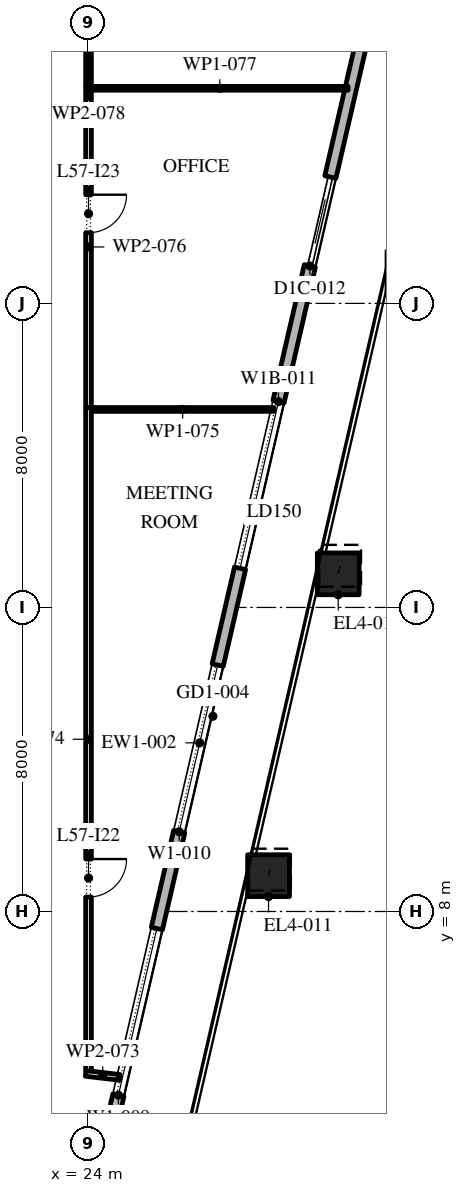
"""IFC4 building model, lengths in metres.
Left out: names, types, materials, properties, quantities, classifications, styles, units other than length and angle.
Written with IfcOpenShell. Run it as: python <this file> out.ifc"""

import sys

from ifc_helpers import new_model, si_unit, direction, frame, frame_2d, origin, origin_2d, place, context, subcontext, project, spatial, rectangle, extrude, element, fill, save


model = new_model("IFC4")
c1 = context("Model", 3, precision=1e-05, world=origin(), true_north=direction((0.0, 1.0)))
c2 = subcontext(c1, "Body", "Model", "MODEL_VIEW")
j1 = project(units=[si_unit("LENGTHUNIT", "METRE"), si_unit("PLANEANGLEUNIT", "RADIAN")], contexts=[c1])
p1 = place(None, origin())
s1 = spatial("IfcSite", under=j1, at=p1, CompositionType="ELEMENT")
p2 = place(p1, origin())
s2 = spatial("IfcBuilding", under=s1, at=p2, CompositionType="ELEMENT")
p3 = place(p2, frame((0.0, 0.0, 264.0)))
s3 = spatial("IfcBuildingStorey", under=s2, at=p3, CompositionType="ELEMENT", Elevation=264.0)
p4 = place(p3, frame((28.737, 8.943, 0.0), z_axis=(0.008770884695, 0.037929719907, 0.99924191662), x_axis=(-0.974290512438, 0.225295355862, 0.0)))
e1 = element("IfcColumn", 1, at=p4, inside=s3, PredefinedType="COLUMN", context=c2, shape_type="SweptSolid", body=[
    extrude(rectangle(XDim=1.1, YDim=1.1, at=origin_2d()), origin(), (0.0, 0.0, 1.0), 4.203),
])
p5 = place(p3, frame((30.57, 16.885, 0.0), z_axis=(0.011668301382, 0.050504588071, 0.998655665045), x_axis=(-0.974334539389, 0.225104876342, 0.0)))
e2 = element("IfcColumn", 2, at=p5, inside=s3, PredefinedType="COLUMN", context=c2, shape_type="SweptSolid", body=[
    extrude(rectangle(XDim=1.1, YDim=1.1, at=origin_2d()), origin(), (0.0, 0.0, 1.0), 4.206),
])
p6 = place(p3, frame((32.404, 24.826, 0.0), z_axis=(0.014559841898, 0.063111984005, 0.997900239743), x_axis=(-0.97440628778, 0.224794097641, 0.0)))
e3 = element("IfcColumn", 3, at=p6, inside=s3, PredefinedType="COLUMN", context=c2, shape_type="SweptSolid", body=[
    extrude(rectangle(XDim=1.1, YDim=1.1, at=origin_2d()), origin(), (0.0, 0.0, 1.0), 4.209),
])
p7 = place(p3, frame((21.359, -11.678, 0.0), z_axis=(0.0, 0.0, 1.0), x_axis=(0.224949198343, 0.974370493275, 0.0)))
e4 = element("IfcWall", 4, at=p7, inside=s3, PredefinedType="STANDARD", context=c2, shape_type="SweptSolid", body=[
    extrude(rectangle(XDim=49.5, YDim=0.3, at=frame_2d((24.75, 0.0))), origin(), (0.0, 0.0, 1.0), 4.0),
])
p8 = place(p7, frame((1.157, 0.0, 0.45)))
e5 = element("IfcOpeningElement", 5, at=p8, cuts=e4, PredefinedType="OPENING", context=c2, shape_type="SweptSolid", body=[
    extrude(rectangle(XDim=4.5, YDim=3.05, at=frame_2d((2.25, 1.525))), frame((0.0, 0.16, 0.0), z_axis=(0.0, -1.0, 0.0), x_axis=(1.0, 0.0, 0.0)), (0.0, 0.0, 1.0), 0.32),
])
p9 = place(p7, frame((8.121, 0.0, 0.45)))
e6 = element("IfcOpeningElement", 6, at=p9, cuts=e4, PredefinedType="OPENING", context=c2, shape_type="SweptSolid", body=[
    extrude(rectangle(XDim=4.5, YDim=3.05, at=frame_2d((2.25, 1.525))), frame((0.0, 0.16, 0.0), z_axis=(0.0, -1.0, 0.0), x_axis=(1.0, 0.0, 0.0)), (0.0, 0.0, 1.0), 0.32),
])
p10 = place(p7, frame((15.236, 0.0, 0.45)))
e7 = element("IfcOpeningElement", 7, at=p10, cuts=e4, PredefinedType="OPENING", context=c2, shape_type="SweptSolid", body=[
    extrude(rectangle(XDim=4.5, YDim=3.05, at=frame_2d((2.25, 1.525))), frame((0.0, 0.16, 0.0), z_axis=(0.0, -1.0, 0.0), x_axis=(1.0, 0.0, 0.0)), (0.0, 0.0, 1.0), 0.32),
])
p11 = place(p7, frame((22.35, 0.0, 0.45)))
e8 = element("IfcOpeningElement", 8, at=p11, cuts=e4, PredefinedType="OPENING", context=c2, shape_type="SweptSolid", body=[
    extrude(rectangle(XDim=4.5, YDim=3.05, at=frame_2d((2.25, 1.525))), frame((0.0, 0.16, 0.0), z_axis=(0.0, -1.0, 0.0), x_axis=(1.0, 0.0, 0.0)), (0.0, 0.0, 1.0), 0.32),
])
p12 = place(p7, frame((29.464, 0.0, 0.45)))
e9 = element("IfcOpeningElement", 9, at=p12, cuts=e4, PredefinedType="OPENING", context=c2, shape_type="SweptSolid", body=[
    extrude(rectangle(XDim=4.5, YDim=2.95, at=frame_2d((2.25, 1.475))), frame((0.0, 0.16, 0.0), z_axis=(0.0, -1.0, 0.0), x_axis=(1.0, 0.0, 0.0)), (0.0, 0.0, 1.0), 0.32),
])
p13 = place(p7, frame((37.628, 0.0, 0.0)))
e10 = element("IfcOpeningElement", 10, at=p13, cuts=e4, PredefinedType="OPENING", context=c2, shape_type="SweptSolid", body=[
    extrude(rectangle(XDim=2.4, YDim=3.325, at=frame_2d((1.2, 1.663))), frame((0.0, 0.16, 0.0), z_axis=(0.0, -1.0, 0.0), x_axis=(1.0, 0.0, 0.0)), (0.0, 0.0, 1.0), 0.32),
])
p14 = place(p7, frame((43.693, 0.0, 0.45)))
e11 = element("IfcOpeningElement", 11, at=p14, cuts=e4, PredefinedType="OPENING", context=c2, shape_type="SweptSolid", body=[
    extrude(rectangle(XDim=4.5, YDim=3.05, at=frame_2d((2.25, 1.525))), frame((0.0, 0.16, 0.0), z_axis=(0.0, -1.0, 0.0), x_axis=(1.0, 0.0, 0.0)), (0.0, 0.0, 1.0), 0.32),
])
p15 = place(p3, frame((23.925, 3.739, 0.0), z_axis=(0.0, 0.0, 1.0), x_axis=(0.993344839434, -0.115178253021, 0.0)))
e12 = element("IfcWall", 12, at=p15, inside=s3, PredefinedType="PARTITIONING", context=c2, shape_type="SweptSolid", body=[
    extrude(rectangle(XDim=0.903, YDim=0.15, at=frame_2d((0.452, 0.0))), origin(), (0.0, 0.0, 1.0), 4.0),
])
p16 = place(p3, frame((24.0, 21.26, 0.0), z_axis=(0.0, 0.0, 1.0), x_axis=(0.0, -1.0, 0.0)))
e13 = element("IfcWall", 13, at=p16, inside=s3, PredefinedType="PARTITIONING", context=c2, shape_type="SweptSolid", body=[
    extrude(rectangle(XDim=17.455, YDim=0.15, at=frame_2d((8.728, 0.0))), origin(), (0.0, 0.0, 1.0), 4.0),
])
p17 = place(p16, frame((11.88, 0.0, 0.0)))
e14 = element("IfcOpeningElement", 14, at=p17, cuts=e13, PredefinedType="OPENING", context=c2, shape_type="SweptSolid", body=[
    extrude(rectangle(XDim=1.0, YDim=2.1, at=frame_2d((0.5, 1.05))), frame((0.0, 0.085, 0.0), z_axis=(0.0, -1.0, 0.0), x_axis=(1.0, 0.0, 0.0)), (0.0, 0.0, 1.0), 0.17),
])
p18 = place(p3, frame((24.075, 21.21, 0.0), z_axis=(0.0, 0.0, 1.0), x_axis=(1.0, 0.0, 0.0)))
e15 = element("IfcWall", 15, at=p18, inside=s3, PredefinedType="PARTITIONING", context=c2, shape_type="SweptSolid", body=[
    extrude(rectangle(XDim=4.805, YDim=0.1, at=frame_2d((2.402, 0.0))), origin(), (0.0, 0.0, 1.0), 4.0),
])
p19 = place(p3, frame((24.0, 29.71, 0.0), z_axis=(0.0, 0.0, 1.0), x_axis=(0.0, -1.0, 0.0)))
e16 = element("IfcWall", 16, at=p19, inside=s3, PredefinedType="PARTITIONING", context=c2, shape_type="SweptSolid", body=[
    extrude(rectangle(XDim=8.45, YDim=0.15, at=frame_2d((4.225, 0.0))), origin(), (0.0, 0.0, 1.0), 4.0),
])
p20 = place(p19, frame((2.85, 0.0, 0.0)))
e17 = element("IfcOpeningElement", 17, at=p20, cuts=e16, PredefinedType="OPENING", context=c2, shape_type="SweptSolid", body=[
    extrude(rectangle(XDim=1.0, YDim=2.1, at=frame_2d((0.5, 1.05))), frame((0.0, 0.085, 0.0), z_axis=(0.0, -1.0, 0.0), x_axis=(1.0, 0.0, 0.0)), (0.0, 0.0, 1.0), 0.17),
])
p21 = place(p3, frame((24.075, 29.66, 0.0), z_axis=(0.0, 0.0, 1.0), x_axis=(1.0, 0.0, 0.0)))
e18 = element("IfcWall", 18, at=p21, inside=s3, PredefinedType="PARTITIONING", context=c2, shape_type="SweptSolid", body=[
    extrude(rectangle(XDim=6.756, YDim=0.1, at=frame_2d((3.378, 0.0))), origin(), (0.0, 0.0, 1.0), 4.0),
])
p22 = place(p3, frame((24.0, 32.625, 0.0), z_axis=(0.0, 0.0, 1.0), x_axis=(0.0, -1.0, 0.0)))
e19 = element("IfcWall", 19, at=p22, inside=s3, PredefinedType="PARTITIONING", context=c2, shape_type="SweptSolid", body=[
    extrude(rectangle(XDim=2.915, YDim=0.15, at=frame_2d((1.458, 0.0))), origin(), (0.0, 0.0, 1.0), 4.0),
])
p23 = place(p22, frame((0.565, 0.0, 0.0)))
e20 = element("IfcOpeningElement", 20, at=p23, cuts=e19, PredefinedType="OPENING", context=c2, shape_type="SweptSolid", body=[
    extrude(rectangle(XDim=1.0, YDim=2.1, at=frame_2d((0.5, 1.05))), frame((0.0, 0.085, 0.0), z_axis=(0.0, -1.0, 0.0), x_axis=(1.0, 0.0, 0.0)), (0.0, 0.0, 1.0), 0.17),
])
p24 = place(p10, origin())
e21 = element("IfcWindow", 21, at=p24, inside=s3, PartitioningType="DOUBLE_PANEL_VERTICAL", PredefinedType="WINDOW", context=c2, shape_type="SweptSolid", body=[
    extrude(rectangle(XDim=4.5, YDim=3.05, at=frame_2d((2.25, 1.525))), frame((0.0, 0.03, 0.0), z_axis=(0.0, -1.0, 0.0), x_axis=(1.0, 0.0, 0.0)), (0.0, 0.0, 1.0), 0.06),
])
fill(e7, e21)
p25 = place(p11, origin())
e22 = element("IfcWindow", 22, at=p25, inside=s3, PartitioningType="DOUBLE_PANEL_VERTICAL", PredefinedType="WINDOW", context=c2, shape_type="SweptSolid", body=[
    extrude(rectangle(XDim=4.5, YDim=3.05, at=frame_2d((2.25, 1.525))), frame((0.0, 0.03, 0.0), z_axis=(0.0, -1.0, 0.0), x_axis=(1.0, 0.0, 0.0)), (0.0, 0.0, 1.0), 0.06),
])
fill(e8, e22)
p26 = place(p12, origin())
e23 = element("IfcWindow", 23, at=p26, inside=s3, PartitioningType="DOUBLE_PANEL_VERTICAL", PredefinedType="WINDOW", context=c2, shape_type="SweptSolid", body=[
    extrude(rectangle(XDim=4.5, YDim=2.95, at=frame_2d((2.25, 1.475))), frame((0.0, 0.03, 0.0), z_axis=(0.0, -1.0, 0.0), x_axis=(1.0, 0.0, 0.0)), (0.0, 0.0, 1.0), 0.06),
])
fill(e9, e23)
p27 = place(p13, origin())
e24 = element("IfcDoor", 24, at=p27, inside=s3, OperationType="DOUBLE_DOOR_SLIDING", PredefinedType="DOOR", context=c2, shape_type="SweptSolid", body=[
    extrude(rectangle(XDim=2.4, YDim=3.325, at=frame_2d((1.2, 1.663))), frame((0.0, 0.025, 0.0), z_axis=(0.0, -1.0, 0.0), x_axis=(1.0, 0.0, 0.0)), (0.0, 0.0, 1.0), 0.05),
])
fill(e10, e24)
p28 = place(p17, origin())
e25 = element("IfcDoor", 25, at=p28, inside=s3, OperationType="SINGLE_SWING_RIGHT", PredefinedType="DOOR", context=c2, shape_type="SweptSolid", body=[
    extrude(rectangle(XDim=1.0, YDim=2.1, at=frame_2d((0.5, 1.05))), frame((0.0, 0.025, 0.0), z_axis=(0.0, -1.0, 0.0), x_axis=(1.0, 0.0, 0.0)), (0.0, 0.0, 1.0), 0.05),
])
fill(e14, e25)
p29 = place(p20, origin())
e26 = element("IfcDoor", 26, at=p29, inside=s3, OperationType="SINGLE_SWING_RIGHT", PredefinedType="DOOR", context=c2, shape_type="SweptSolid", body=[
    extrude(rectangle(XDim=1.0, YDim=2.1, at=frame_2d((0.5, 1.05))), frame((0.0, 0.025, 0.0), z_axis=(0.0, -1.0, 0.0), x_axis=(1.0, 0.0, 0.0)), (0.0, 0.0, 1.0), 0.05),
])
fill(e17, e26)
save(model, sys.argv[1])
